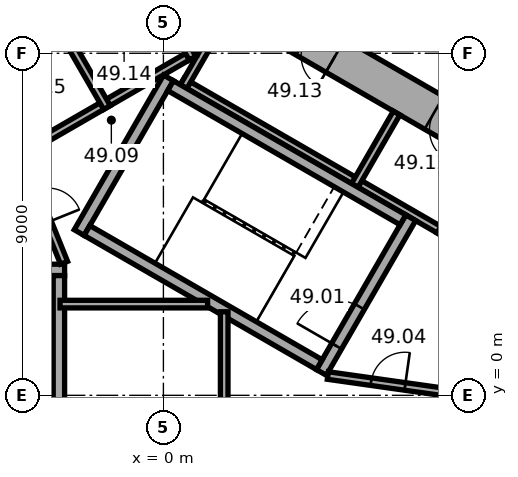
"""IFC4 building model, lengths in metres.
Left out: names, types, materials, properties, quantities, classifications, styles, units other than length and angle.
Written with IfcOpenShell. Run it as: python <this file> out.ifc"""

import sys

from ifc_helpers import new_model, si_unit, direction, frame, frame_2d, origin, place, context, subcontext, project, spatial, rectangle, extrude, element, fill, save


model = new_model("IFC4")
c1 = context("Model", 3, precision=1e-05, world=origin(), true_north=direction((0.0, 1.0)))
c2 = subcontext(c1, "Body", "Model", "MODEL_VIEW")
j1 = project(units=[si_unit("LENGTHUNIT", "METRE"), si_unit("PLANEANGLEUNIT", "RADIAN")], contexts=[c1])
p1 = place(None, origin())
s1 = spatial("IfcSite", under=j1, at=p1, CompositionType="ELEMENT")
p2 = place(p1, origin())
s2 = spatial("IfcBuilding", under=s1, at=p2, CompositionType="ELEMENT")
p3 = place(p2, frame((0.0, 0.0, 198.4)))
s3 = spatial("IfcBuildingStorey", under=s2, at=p3, CompositionType="ELEMENT", Elevation=198.4)
p4 = place(p3, frame((10.25, 5.629, 0.0), z_axis=(0.0, 0.0, 1.0), x_axis=(-0.866022616891, 0.50000482701, 0.0)))
e1 = element("IfcWall", 1, at=p4, inside=s3, PredefinedType="SHEAR", context=c2, shape_type="SweptSolid", body=[
    extrude(rectangle(XDim=12.125, YDim=1.0, at=frame_2d((6.062, 0.0))), origin(), (0.0, 0.0, 1.0), 3.7),
])
p5 = place(p4, frame((2.712, 0.0, 0.0)))
e2 = element("IfcOpeningElement", 2, at=p5, cuts=e1, PredefinedType="OPENING", context=c2, shape_type="SweptSolid", body=[
    extrude(rectangle(XDim=0.9, YDim=2.1, at=frame_2d((0.45, 1.05))), frame((0.0, 0.51, 0.0), z_axis=(0.0, -1.0, 0.0), x_axis=(1.0, 0.0, 0.0)), (0.0, 0.0, 1.0), 1.02),
])
p6 = place(p4, frame((6.612, 0.0, 0.0)))
e3 = element("IfcOpeningElement", 3, at=p6, cuts=e1, PredefinedType="OPENING", context=c2, shape_type="SweptSolid", body=[
    extrude(rectangle(XDim=0.9, YDim=2.1, at=frame_2d((0.45, 1.05))), frame((0.0, 0.51, 0.0), z_axis=(0.0, -1.0, 0.0), x_axis=(1.0, 0.0, 0.0)), (0.0, 0.0, 1.0), 1.02),
])
p7 = place(p3, frame((0.25, 11.691, 0.0), z_axis=(0.0, 0.0, 1.0), x_axis=(-0.866022616891, -0.50000482701, 0.0)))
e4 = element("IfcWall", 4, at=p7, inside=s3, PredefinedType="SHEAR", context=c2, shape_type="SweptSolid", body=[
    extrude(rectangle(XDim=12.125, YDim=1.0, at=frame_2d((6.062, 0.0))), origin(), (0.0, 0.0, 1.0), 3.7),
])
p8 = place(p7, frame((6.262, 0.0, 0.0)))
e5 = element("IfcOpeningElement", 5, at=p8, cuts=e4, PredefinedType="OPENING", context=c2, shape_type="SweptSolid", body=[
    extrude(rectangle(XDim=1.5, YDim=2.1, at=frame_2d((0.75, 1.05))), frame((0.0, 0.51, 0.0), z_axis=(0.0, -1.0, 0.0), x_axis=(1.0, 0.0, 0.0)), (0.0, 0.0, 1.0), 1.02),
])
p9 = place(p7, frame((1.812, 0.0, 0.0)))
e6 = element("IfcOpeningElement", 6, at=p9, cuts=e4, PredefinedType="OPENING", context=c2, shape_type="SweptSolid", body=[
    extrude(rectangle(XDim=0.9, YDim=2.1, at=frame_2d((0.45, 1.05))), frame((0.0, 0.51, 0.0), z_axis=(0.0, -1.0, 0.0), x_axis=(1.0, 0.0, 0.0)), (0.0, 0.0, 1.0), 1.02),
])
p10 = place(p7, frame((4.412, 0.0, 0.0)))
e7 = element("IfcOpeningElement", 7, at=p10, cuts=e4, PredefinedType="OPENING", context=c2, shape_type="SweptSolid", body=[
    extrude(rectangle(XDim=0.9, YDim=2.1, at=frame_2d((0.45, 1.05))), frame((0.0, 0.51, 0.0), z_axis=(0.0, -1.0, 0.0), x_axis=(1.0, 0.0, 0.0)), (0.0, 0.0, 1.0), 1.02),
])
p11 = place(p3, frame((7.424, 4.259, 0.0), z_axis=(0.0, 0.0, 1.0), x_axis=(-0.866026010844, 0.49999894854, 0.0)))
e8 = element("IfcWall", 8, at=p11, inside=s3, PredefinedType="PARTITIONING", context=c2, shape_type="SweptSolid", body=[
    extrude(rectangle(XDim=8.0, YDim=0.2, at=frame_2d((4.0, 0.0))), origin(), (0.0, 0.0, 1.0), 3.42),
])
for number, where, z_axis, x_axis in (
    (9, (7.287, 4.222, 0.0), (0.0, 0.0, 1.0), (0.5, 0.866, 0.0)),
    (10, (5.036, 5.522, 0.0), (0.0, 0.0, 1.0), (0.5, 0.866, 0.0)),
    (11, (0.532, 8.122, 0.0), (0.0, 0.0, 1.0), (0.5, 0.866, 0.0)),
):
    element("IfcWall", number, at=place(p3, frame(where, z_axis=z_axis, x_axis=x_axis)), inside=s3, PredefinedType="PARTITIONING", context=c2, shape_type="SweptSolid", body=[
        extrude(rectangle(XDim=2.2, YDim=0.2, at=frame_2d((1.1, 0.0))), origin(), (0.0, 0.0, 1.0), 3.42),
    ])
p12 = place(p3, frame((0.803, 9.009, 0.0), z_axis=(0.0, 0.0, 1.0), x_axis=(-0.866028230842, -0.499995103361, 0.0)))
e12 = element("IfcWall", 12, at=p12, inside=s3, PredefinedType="PARTITIONING", context=c2, shape_type="SweptSolid", body=[
    extrude(rectangle(XDim=5.4, YDim=0.2, at=frame_2d((2.7, 0.0))), origin(), (0.0, 0.0, 1.0), 3.42),
])
p13 = place(p3, frame((0.767, 8.872, 0.0), z_axis=(0.0, 0.0, 1.0), x_axis=(-0.499994660107, 0.866028486751, 0.0)))
e13 = element("IfcWall", 13, at=p13, inside=s3, PredefinedType="PARTITIONING", context=c2, shape_type="SweptSolid", body=[
    extrude(rectangle(XDim=2.2, YDim=0.2, at=frame_2d((1.1, 0.0))), origin(), (0.0, 0.0, 1.0), 3.42),
])
p14 = place(p3, frame((-1.485, 7.572, 0.0), z_axis=(0.0, 0.0, 1.0), x_axis=(-0.50002983664, 0.866008176907, 0.0)))
e14 = element("IfcWall", 14, at=p14, inside=s3, PredefinedType="PARTITIONING", context=c2, shape_type="SweptSolid", body=[
    extrude(rectangle(XDim=2.2, YDim=0.2, at=frame_2d((1.1, 0.0))), origin(), (0.0, 0.0, 1.0), 3.42),
])
p15 = place(p3, frame((4.158, 0.602, 0.0), z_axis=(0.0, 0.0, 1.0), x_axis=(0.499977259774, 0.866038532462, 0.0)))
e15 = element("IfcWall", 15, at=p15, inside=s3, PredefinedType="SHEAR", context=c2, shape_type="SweptSolid", body=[
    extrude(rectangle(XDim=4.7, YDim=0.3, at=frame_2d((2.35, 0.0))), origin(), (0.0, 0.0, 1.0), 3.42),
])
p16 = place(p15, frame((0.8, 0.0, 0.0)))
e16 = element("IfcOpeningElement", 16, at=p16, cuts=e15, PredefinedType="OPENING", context=c2, shape_type="SweptSolid", body=[
    extrude(rectangle(XDim=1.2, YDim=2.1, at=frame_2d((0.6, 1.05))), frame((0.0, 0.16, 0.0), z_axis=(0.0, -1.0, 0.0), x_axis=(1.0, 0.0, 0.0)), (0.0, 0.0, 1.0), 0.32),
])
p17 = place(p3, frame((-2.216, 4.282, 0.0), z_axis=(0.0, 0.0, 1.0), x_axis=(0.499977259774, 0.866038532462, 0.0)))
e17 = element("IfcWall", 17, at=p17, inside=s3, PredefinedType="SHEAR", context=c2, shape_type="SweptSolid", body=[
    extrude(rectangle(XDim=4.7, YDim=0.3, at=frame_2d((2.35, 0.0))), origin(), (0.0, 0.0, 1.0), 3.42),
])
for number, where, z_axis, x_axis in (
    (18, (4.103, 0.807, 0.0), (0.0, 0.0, 1.0), (-0.866, 0.5, 0.0)),
    (19, (6.303, 4.617, 0.0), (0.0, 0.0, 1.0), (-0.866, 0.5, 0.0)),
):
    element("IfcWall", number, at=place(p3, frame(where, z_axis=z_axis, x_axis=x_axis)), inside=s3, PredefinedType="SHEAR", context=c2, shape_type="SweptSolid", body=[
        extrude(rectangle(XDim=7.06, YDim=0.3, at=frame_2d((3.53, 0.0))), origin(), (0.0, 0.0, 1.0), 3.42),
    ])
p18 = place(p3, frame((-2.6, 3.3, 0.0), z_axis=(0.0, 0.0, 1.0), x_axis=(-1.0, 0.0, 0.0)))
e20 = element("IfcWall", 20, at=p18, inside=s3, PredefinedType="SHEAR", context=c2, shape_type="SweptSolid", body=[
    extrude(rectangle(XDim=4.7, YDim=0.3, at=frame_2d((2.35, 0.0))), origin(), (0.0, 0.0, 1.0), 3.42),
])
p19 = place(p18, frame((0.8, 0.0, 0.0)))
e21 = element("IfcOpeningElement", 21, at=p19, cuts=e20, PredefinedType="OPENING", context=c2, shape_type="SweptSolid", body=[
    extrude(rectangle(XDim=1.2, YDim=2.1, at=frame_2d((0.6, 1.05))), frame((0.0, 0.16, 0.0), z_axis=(0.0, -1.0, 0.0), x_axis=(1.0, 0.0, 0.0)), (0.0, 0.0, 1.0), 0.32),
])
p20 = place(p3, frame((-2.75, 3.15, 0.0), z_axis=(0.0, 0.0, 1.0), x_axis=(0.0, -1.0, 0.0)))
e22 = element("IfcWall", 22, at=p20, inside=s3, PredefinedType="SHEAR", context=c2, shape_type="SweptSolid", body=[
    extrude(rectangle(XDim=7.06, YDim=0.3, at=frame_2d((3.53, 0.0))), origin(), (0.0, 0.0, 1.0), 3.42),
])
p21 = place(p3, frame((4.327, 0.521, 0.0), z_axis=(0.0, 0.0, 1.0), x_axis=(0.990124376366, -0.14019172346, 0.0)))
e23 = element("IfcWall", 23, at=p21, inside=s3, PredefinedType="PARTITIONING", context=c2, shape_type="SweptSolid", body=[
    extrude(rectangle(XDim=3.002, YDim=0.2, at=frame_2d((1.501, 0.0))), origin(), (0.0, 0.0, 1.0), 3.42),
])
p22 = place(p21, frame((1.15, 0.0, 0.0)))
e24 = element("IfcOpeningElement", 24, at=p22, cuts=e23, PredefinedType="OPENING", context=c2, shape_type="SweptSolid", body=[
    extrude(rectangle(XDim=0.9, YDim=2.1, at=frame_2d((0.45, 1.05))), frame((0.0, 0.11, 0.0), z_axis=(0.0, -1.0, 0.0), x_axis=(1.0, 0.0, 0.0)), (0.0, 0.0, 1.0), 0.22),
])
p23 = place(p3, frame((-2.615, 3.487, 0.0), z_axis=(0.0, 0.0, 1.0), x_axis=(-0.373576831041, 0.92759924068, 0.0)))
e25 = element("IfcWall", 25, at=p23, inside=s3, PredefinedType="PARTITIONING", context=c2, shape_type="SweptSolid", body=[
    extrude(rectangle(XDim=3.002, YDim=0.2, at=frame_2d((1.501, 0.0))), origin(), (0.0, 0.0, 1.0), 3.42),
])
p24 = place(p23, frame((1.15, 0.0, 0.0)))
e26 = element("IfcOpeningElement", 26, at=p24, cuts=e25, PredefinedType="OPENING", context=c2, shape_type="SweptSolid", body=[
    extrude(rectangle(XDim=0.9, YDim=2.1, at=frame_2d((0.45, 1.05))), frame((0.0, 0.11, 0.0), z_axis=(0.0, -1.0, 0.0), x_axis=(1.0, 0.0, 0.0)), (0.0, 0.0, 1.0), 0.22),
])
p25 = place(p3, frame((-2.72, 2.4, 0.0), z_axis=(0.0, 0.0, 1.0), x_axis=(1.0, 0.0, 0.0)))
e27 = element("IfcWall", 27, at=p25, inside=s3, PredefinedType="PARTITIONING", context=c2, shape_type="SweptSolid", body=[
    extrude(rectangle(XDim=3.883, YDim=0.2, at=frame_2d((1.941, 0.0))), origin(), (0.0, 0.0, 1.0), 3.42),
])
p26 = place(p3, frame((1.6, -2.198, 0.0), z_axis=(0.0, 0.0, 1.0), x_axis=(0.0, 1.0, 0.0)))
e28 = element("IfcWall", 28, at=p26, inside=s3, PredefinedType="PARTITIONING", context=c2, shape_type="SweptSolid", body=[
    extrude(rectangle(XDim=4.397, YDim=0.2, at=frame_2d((2.198, 0.0))), origin(), (0.0, 0.0, 1.0), 3.42),
])
p27 = place(p16, origin())
e29 = element("IfcDoor", 29, at=p27, inside=s3, OperationType="SINGLE_SWING_RIGHT", PredefinedType="DOOR", context=c2, shape_type="SweptSolid", body=[
    extrude(rectangle(XDim=1.2, YDim=2.1, at=frame_2d((0.6, 1.05))), frame((0.0, 0.025, 0.0), z_axis=(0.0, -1.0, 0.0), x_axis=(1.0, 0.0, 0.0)), (0.0, 0.0, 1.0), 0.05),
])
fill(e16, e29)
p28 = place(p22, origin())
e30 = element("IfcDoor", 30, at=p28, inside=s3, OperationType="SINGLE_SWING_LEFT", PredefinedType="DOOR", context=c2, shape_type="SweptSolid", body=[
    extrude(rectangle(XDim=0.9, YDim=2.1, at=frame_2d((0.45, 1.05))), frame((0.0, 0.025, 0.0), z_axis=(0.0, -1.0, 0.0), x_axis=(1.0, 0.0, 0.0)), (0.0, 0.0, 1.0), 0.05),
])
fill(e24, e30)
p29 = place(p5, origin())
e31 = element("IfcDoor", 31, at=p29, inside=s3, OperationType="SINGLE_SWING_LEFT", PredefinedType="DOOR", context=c2, shape_type="SweptSolid", body=[
    extrude(rectangle(XDim=0.9, YDim=2.1, at=frame_2d((0.45, 1.05))), frame((0.0, 0.025, 0.0), z_axis=(0.0, -1.0, 0.0), x_axis=(1.0, 0.0, 0.0)), (0.0, 0.0, 1.0), 0.05),
])
fill(e2, e31)
p30 = place(p6, origin())
e32 = element("IfcDoor", 32, at=p30, inside=s3, OperationType="SINGLE_SWING_LEFT", PredefinedType="DOOR", context=c2, shape_type="SweptSolid", body=[
    extrude(rectangle(XDim=0.9, YDim=2.1, at=frame_2d((0.45, 1.05))), frame((0.0, 0.025, 0.0), z_axis=(0.0, -1.0, 0.0), x_axis=(1.0, 0.0, 0.0)), (0.0, 0.0, 1.0), 0.05),
])
fill(e3, e32)
save(model, sys.argv[1])
